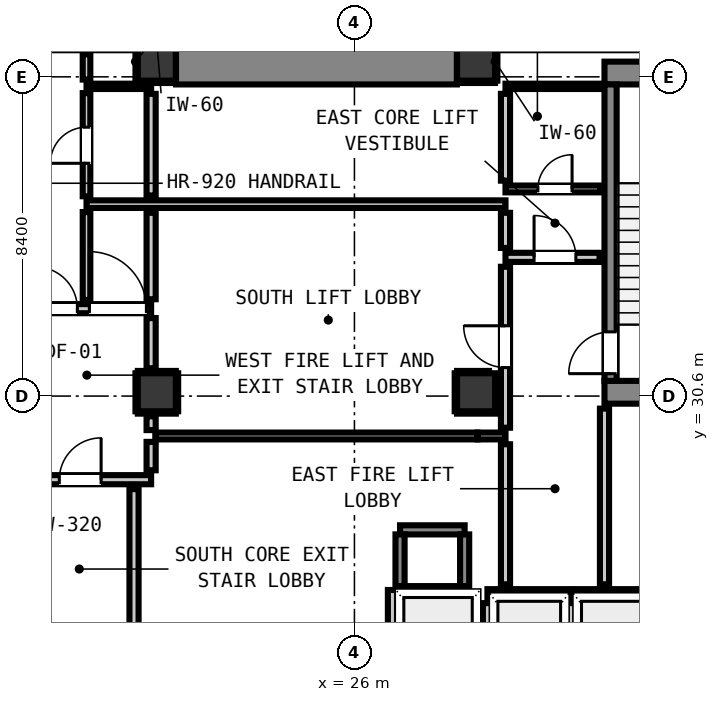
"""IFC4 building model, lengths in metres.
Left out: names, types, materials, properties, quantities, classifications, styles, units other than length and angle.
Written with IfcOpenShell. Run it as: python <this file> out.ifc"""

import sys

from ifc_helpers import new_model, si_unit, direction, frame, frame_2d, origin, origin_2d, place, context, subcontext, project, spatial, rectangle, extrude, element, fill, save


model = new_model("IFC4")
c1 = context("Model", 3, precision=1e-05, world=origin(), true_north=direction((0.0, 1.0)))
c2 = subcontext(c1, "Body", "Model", "MODEL_VIEW")
j1 = project(units=[si_unit("LENGTHUNIT", "METRE"), si_unit("PLANEANGLEUNIT", "RADIAN")], contexts=[c1])
p1 = place(None, origin())
s1 = spatial("IfcSite", under=j1, at=p1, CompositionType="ELEMENT")
p2 = place(p1, origin())
s2 = spatial("IfcBuilding", under=s1, at=p2, CompositionType="ELEMENT")
p3 = place(p2, frame((0.0, 0.0, -13.2)))
s3 = spatial("IfcBuildingStorey", under=s2, at=p3, CompositionType="ELEMENT", Elevation=-13.2)
for number, where, z_axis, x_axis in (
    (1, (20.8, 39.4, -0.4), (0.0, 0.0, 1.0), (1.0, 0.0, 0.0)),
    (2, (29.2, 39.4, -0.4), (0.0, 0.0, 1.0), (1.0, 0.0, 0.0)),
):
    element("IfcColumn", number, at=place(p3, frame(where, z_axis=z_axis, x_axis=x_axis)), inside=s3, PredefinedType="COLUMN", context=c2, shape_type="SweptSolid", body=[
        extrude(rectangle(XDim=1.0, YDim=1.0, at=origin_2d()), origin(), (0.0, 0.0, 1.0), 4.8),
    ])
p4 = place(p3, frame((32.58, 39.1, 0.0), z_axis=(0.0, 0.0, 1.0), x_axis=(1.0, 0.0, 0.0)))
e3 = element("IfcWall", 3, at=p4, inside=s3, PredefinedType="SHEAR", context=c2, shape_type="SweptSolid", body=[
    extrude(rectangle(XDim=4.08, YDim=0.6, at=frame_2d((2.04, 0.0))), origin(), (0.0, 0.0, 1.0), 4.4),
])
p5 = place(p3, frame((32.58, 30.7, 0.0), z_axis=(0.0, 0.0, 1.0), x_axis=(1.0, 0.0, 0.0)))
e4 = element("IfcWall", 4, at=p5, inside=s3, PredefinedType="SHEAR", context=c2, shape_type="SweptSolid", body=[
    extrude(rectangle(XDim=3.415, YDim=0.6, at=frame_2d((1.708, 0.0))), origin(), (0.0, 0.0, 1.0), 4.4),
])
p6 = place(p3, frame((21.305, 39.4, 0.0), z_axis=(0.0, 0.0, 1.0), x_axis=(1.0, 0.0, 0.0)))
e5 = element("IfcWall", 5, at=p6, inside=s3, PredefinedType="SHEAR", context=c2, shape_type="SweptSolid", body=[
    extrude(rectangle(XDim=7.39, YDim=1.2, at=frame_2d((3.695, 0.0))), origin(), (0.0, 0.0, 1.0), 4.4),
])
p7 = place(p3, frame((32.74, 31.0, 0.0), z_axis=(0.0, 0.0, 1.0), x_axis=(0.0, 1.0, 0.0)))
e6 = element("IfcWall", 6, at=p7, inside=s3, PredefinedType="SHEAR", context=c2, shape_type="SweptSolid", body=[
    extrude(rectangle(XDim=7.8, YDim=0.32, at=frame_2d((3.9, 0.0))), origin(), (0.0, 0.0, 1.0), 4.4),
])
p8 = place(p7, frame((0.19, 0.0, 0.0)))
e7 = element("IfcOpeningElement", 7, at=p8, cuts=e6, PredefinedType="OPENING", context=c2, shape_type="SweptSolid", body=[
    extrude(rectangle(XDim=1.1, YDim=2.15, at=frame_2d((0.55, 1.075))), frame((0.0, 0.17, 0.0), z_axis=(0.0, -1.0, 0.0), x_axis=(1.0, 0.0, 0.0)), (0.0, 0.0, 1.0), 0.34),
])
for number, where, z_axis, x_axis in (
    (8, (27.2, 25.48, 0.0), (0.0, 0.0, 1.0), (1.0, 0.0, 0.0)),
    (9, (27.2, 27.08, 0.0), (0.0, 0.0, 1.0), (1.0, 0.0, 0.0)),
):
    element("IfcWall", number, at=place(p3, frame(where, z_axis=z_axis, x_axis=x_axis)), inside=s3, PredefinedType="SHEAR", context=c2, shape_type="SweptSolid", body=[
        extrude(rectangle(XDim=1.7, YDim=0.24, at=frame_2d((0.85, 0.0))), origin(), (0.0, 0.0, 1.0), 4.4),
    ])
for number, where, z_axis, x_axis in (
    (10, (27.2, 25.6, 0.0), (0.0, 0.0, 1.0), (0.0, 1.0, 0.0)),
    (11, (28.9, 25.6, 0.0), (0.0, 0.0, 1.0), (0.0, 1.0, 0.0)),
):
    element("IfcWall", number, at=place(p3, frame(where, z_axis=z_axis, x_axis=x_axis)), inside=s3, PredefinedType="SHEAR", context=c2, shape_type="SweptSolid", body=[
        extrude(rectangle(XDim=1.36, YDim=0.24, at=frame_2d((0.68, 0.0))), origin(), (0.0, 0.0, 1.0), 4.4),
    ])
for number, where, z_axis, x_axis in (
    (12, (20.8, 30.7, -0.4), (0.0, 0.0, 1.0), (1.0, 0.0, 0.0)),
    (13, (29.2, 30.7, -0.4), (0.0, 0.0, 1.0), (1.0, 0.0, 0.0)),
):
    element("IfcColumn", number, at=place(p3, frame(where, z_axis=z_axis, x_axis=x_axis)), inside=s3, PredefinedType="COLUMN", context=c2, shape_type="SweptSolid", body=[
        extrude(rectangle(XDim=1.0, YDim=1.0, at=origin_2d()), origin(), (0.0, 0.0, 1.0), 4.8),
    ])
p9 = place(p3, frame((29.5, 25.4, 0.0), z_axis=(0.0, 0.0, 1.0), x_axis=(1.0, 0.0, 0.0)))
e14 = element("IfcWall", 14, at=p9, inside=s3, PredefinedType="PARTITIONING", context=c2, shape_type="SweptSolid", body=[
    extrude(rectangle(XDim=2.2, YDim=0.24, at=frame_2d((1.1, 0.0))), origin(), (0.0, 0.0, 1.0), 4.1),
])
p10 = place(p3, frame((29.5, 22.632, 0.0), z_axis=(0.0, 0.0, 1.0), x_axis=(0.0, 1.0, 0.0)))
e15 = element("IfcWall", 15, at=p10, inside=s3, PredefinedType="PARTITIONING", context=c2, shape_type="SweptSolid", body=[
    extrude(rectangle(XDim=2.52, YDim=0.24, at=frame_2d((1.26, 0.0))), origin(), (0.0, 0.0, 1.0), 3.135),
])
p11 = place(p3, frame((31.7, 22.73, 0.0), z_axis=(0.0, 0.0, 1.0), x_axis=(0.0, 1.0, 0.0)))
e16 = element("IfcWall", 16, at=p11, inside=s3, PredefinedType="PARTITIONING", context=c2, shape_type="SweptSolid", body=[
    extrude(rectangle(XDim=2.422, YDim=0.24, at=frame_2d((1.211, 0.0))), origin(), (0.0, 0.0, 1.0), 4.1),
])
p12 = place(p3, frame((31.828, 25.4, 0.0), z_axis=(0.0, 0.0, 1.0), x_axis=(1.0, 0.0, 0.0)))
e17 = element("IfcWall", 17, at=p12, inside=s3, PredefinedType="PARTITIONING", context=c2, shape_type="SweptSolid", body=[
    extrude(rectangle(XDim=2.072, YDim=0.24, at=frame_2d((1.036, 0.0))), origin(), (0.0, 0.0, 1.0), 4.1),
])
p13 = place(p3, frame((27.0, 22.73, 0.0), z_axis=(0.0, 0.0, 1.0), x_axis=(0.0, 1.0, 0.0)))
e18 = element("IfcWall", 18, at=p13, inside=s3, PredefinedType="PARTITIONING", context=c2, shape_type="SweptSolid", body=[
    extrude(rectangle(XDim=2.768, YDim=0.24, at=frame_2d((1.384, 0.0))), origin(), (0.0, 0.0, 1.0), 4.1),
])
p14 = place(p3, frame((17.45, 28.4, 0.0), z_axis=(0.0, 0.0, 1.0), x_axis=(1.0, 0.0, 0.0)))
e19 = element("IfcWall", 19, at=p14, inside=s3, PredefinedType="PARTITIONING", context=c2, shape_type="SweptSolid", body=[
    extrude(rectangle(XDim=3.2, YDim=0.24, at=frame_2d((1.6, 0.0))), origin(), (0.0, 0.0, 1.0), 4.1),
])
p15 = place(p14, frame((0.784, 0.0, 0.0)))
e20 = element("IfcOpeningElement", 20, at=p15, cuts=e19, PredefinedType="OPENING", context=c2, shape_type="SweptSolid", body=[
    extrude(rectangle(XDim=1.1, YDim=2.15, at=frame_2d((0.55, 1.075))), frame((0.0, 0.13, 0.0), z_axis=(0.0, -1.0, 0.0), x_axis=(1.0, 0.0, 0.0)), (0.0, 0.0, 1.0), 0.26),
])
p16 = place(p3, frame((17.45, 32.9, 0.0), z_axis=(0.0, 0.0, 1.0), x_axis=(1.0, 0.0, 0.0)))
e21 = element("IfcWall", 21, at=p16, inside=s3, PredefinedType="PARTITIONING", context=c2, shape_type="SweptSolid", body=[
    extrude(rectangle(XDim=3.2, YDim=0.24, at=frame_2d((1.6, 0.0))), origin(), (0.0, 0.0, 1.0), 4.1),
])
p17 = place(p16, frame((0.159, 0.0, 0.0)))
e22 = element("IfcOpeningElement", 22, at=p17, cuts=e21, PredefinedType="OPENING", context=c2, shape_type="SweptSolid", body=[
    extrude(rectangle(XDim=1.1, YDim=2.15, at=frame_2d((0.55, 1.075))), frame((0.0, 0.13, 0.0), z_axis=(0.0, -1.0, 0.0), x_axis=(1.0, 0.0, 0.0)), (0.0, 0.0, 1.0), 0.26),
])
p18 = place(p16, frame((1.576, 0.0, 0.0)))
e23 = element("IfcOpeningElement", 23, at=p18, cuts=e21, PredefinedType="OPENING", context=c2, shape_type="SweptSolid", body=[
    extrude(rectangle(XDim=1.5, YDim=2.15, at=frame_2d((0.75, 1.075))), frame((0.0, 0.13, 0.0), z_axis=(0.0, -1.0, 0.0), x_axis=(1.0, 0.0, 0.0)), (0.0, 0.0, 1.0), 0.26),
])
p19 = place(p3, frame((29.975, 34.25, 0.0), z_axis=(0.0, 0.0, 1.0), x_axis=(1.0, 0.0, 0.0)))
e24 = element("IfcWall", 24, at=p19, inside=s3, PredefinedType="PARTITIONING", context=c2, shape_type="SweptSolid", body=[
    extrude(rectangle(XDim=2.475, YDim=0.24, at=frame_2d((1.237, 0.0))), origin(), (0.0, 0.0, 1.0), 4.1),
])
p20 = place(p19, frame((0.752, 0.0, 0.0)))
e25 = element("IfcOpeningElement", 25, at=p20, cuts=e24, PredefinedType="OPENING", context=c2, shape_type="SweptSolid", body=[
    extrude(rectangle(XDim=1.1, YDim=2.15, at=frame_2d((0.55, 1.075))), frame((0.0, 0.13, 0.0), z_axis=(0.0, -1.0, 0.0), x_axis=(1.0, 0.0, 0.0)), (0.0, 0.0, 1.0), 0.26),
])
p21 = place(p3, frame((18.95, 35.65, 0.0), z_axis=(0.0, 0.0, 1.0), x_axis=(1.0, 0.0, 0.0)))
e26 = element("IfcWall", 26, at=p21, inside=s3, PredefinedType="PARTITIONING", context=c2, shape_type="SweptSolid", body=[
    extrude(rectangle(XDim=11.025, YDim=0.2, at=frame_2d((5.513, 0.0))), origin(), (0.0, 0.0, 1.0), 4.1),
])
p22 = place(p3, frame((20.76, 29.55, 0.0), z_axis=(0.0, 0.0, 1.0), x_axis=(1.0, 0.0, 0.0)))
e27 = element("IfcWall", 27, at=p22, inside=s3, PredefinedType="PARTITIONING", context=c2, shape_type="SweptSolid", body=[
    extrude(rectangle(XDim=8.48, YDim=0.18, at=frame_2d((4.24, 0.0))), origin(), (0.0, 0.0, 1.0), 3.135),
])
p23 = place(p3, frame((29.24, 29.55, 0.0), z_axis=(0.0, 0.0, 1.0), x_axis=(1.0, 0.0, 0.0)))
e28 = element("IfcWall", 28, at=p23, inside=s3, PredefinedType="PARTITIONING", context=c2, shape_type="SweptSolid", body=[
    extrude(rectangle(XDim=0.735, YDim=0.18, at=frame_2d((0.368, 0.0))), origin(), (0.0, 0.0, 1.0), 4.1),
])
p24 = place(p3, frame((29.975, 36.05, 0.0), z_axis=(0.0, 0.0, 1.0), x_axis=(1.0, 0.0, 0.0)))
e29 = element("IfcWall", 29, at=p24, inside=s3, PredefinedType="PARTITIONING", context=c2, shape_type="SweptSolid", body=[
    extrude(rectangle(XDim=2.505, YDim=0.18, at=frame_2d((1.252, 0.0))), origin(), (0.0, 0.0, 1.0), 4.1),
])
p25 = place(p24, frame((0.852, 0.0, 0.0)))
e30 = element("IfcOpeningElement", 30, at=p25, cuts=e29, PredefinedType="OPENING", context=c2, shape_type="SweptSolid", body=[
    extrude(rectangle(XDim=0.9, YDim=2.1, at=frame_2d((0.45, 1.05))), frame((0.0, 0.1, 0.0), z_axis=(0.0, -1.0, 0.0), x_axis=(1.0, 0.0, 0.0)), (0.0, 0.0, 1.0), 0.2),
])
p26 = place(p3, frame((18.95, 38.75, 0.0), z_axis=(0.0, 0.0, 1.0), x_axis=(1.0, 0.0, 0.0)))
e31 = element("IfcWall", 31, at=p26, inside=s3, PredefinedType="PARTITIONING", context=c2, shape_type="SweptSolid", body=[
    extrude(rectangle(XDim=1.7, YDim=0.14, at=frame_2d((0.85, 0.0))), origin(), (0.0, 0.0, 1.0), 4.1),
])
p27 = place(p3, frame((29.975, 38.75, 0.0), z_axis=(0.0, 0.0, 1.0), x_axis=(1.0, 0.0, 0.0)))
e32 = element("IfcWall", 32, at=p27, inside=s3, PredefinedType="PARTITIONING", context=c2, shape_type="SweptSolid", body=[
    extrude(rectangle(XDim=2.525, YDim=0.14, at=frame_2d((1.262, 0.0))), origin(), (0.0, 0.0, 1.0), 4.1),
])
p28 = place(p3, frame((20.2, 22.586, 0.0), z_axis=(0.0, 0.0, 1.0), x_axis=(0.0, 1.0, 0.0)))
e33 = element("IfcWall", 33, at=p28, inside=s3, PredefinedType="PARTITIONING", context=c2, shape_type="SweptSolid", body=[
    extrude(rectangle(XDim=5.566, YDim=0.24, at=frame_2d((2.783, 0.0))), origin(), (0.0, 0.0, 1.0), 4.1),
])
p29 = place(p3, frame((20.65, 28.648, 0.0), z_axis=(0.0, 0.0, 1.0), x_axis=(0.0, 1.0, 0.0)))
e34 = element("IfcWall", 34, at=p29, inside=s3, PredefinedType="PARTITIONING", context=c2, shape_type="SweptSolid", body=[
    extrude(rectangle(XDim=0.747, YDim=0.24, at=frame_2d((0.374, 0.0))), origin(), (0.0, 0.0, 1.0), 3.135),
])
p30 = place(p3, frame((20.65, 29.705, 0.0), z_axis=(0.0, 0.0, 1.0), x_axis=(0.0, 1.0, 0.0)))
e35 = element("IfcWall", 35, at=p30, inside=s3, PredefinedType="PARTITIONING", context=c2, shape_type="SweptSolid", body=[
    extrude(rectangle(XDim=0.363, YDim=0.24, at=frame_2d((0.182, 0.0))), origin(), (0.0, 0.0, 1.0), 3.135),
])
p31 = place(p3, frame((20.65, 31.332, 0.0), z_axis=(0.0, 0.0, 1.0), x_axis=(0.0, 1.0, 0.0)))
e36 = element("IfcWall", 36, at=p31, inside=s3, PredefinedType="PARTITIONING", context=c2, shape_type="SweptSolid", body=[
    extrude(rectangle(XDim=1.32, YDim=0.24, at=frame_2d((0.66, 0.0))), origin(), (0.0, 0.0, 1.0), 3.135),
])
p32 = place(p3, frame((20.65, 33.148, 0.0), z_axis=(0.0, 0.0, 1.0), x_axis=(0.0, 1.0, 0.0)))
e37 = element("IfcWall", 37, at=p32, inside=s3, PredefinedType="PARTITIONING", context=c2, shape_type="SweptSolid", body=[
    extrude(rectangle(XDim=2.274, YDim=0.24, at=frame_2d((1.137, 0.0))), origin(), (0.0, 0.0, 1.0), 3.135),
])
p33 = place(p3, frame((20.65, 35.878, 0.0), z_axis=(0.0, 0.0, 1.0), x_axis=(0.0, 1.0, 0.0)))
e38 = element("IfcWall", 38, at=p33, inside=s3, PredefinedType="PARTITIONING", context=c2, shape_type="SweptSolid", body=[
    extrude(rectangle(XDim=2.674, YDim=0.24, at=frame_2d((1.337, 0.0))), origin(), (0.0, 0.0, 1.0), 3.135),
])
p34 = place(p3, frame((29.975, 25.648, 0.0), z_axis=(0.0, 0.0, 1.0), x_axis=(0.0, 1.0, 0.0)))
e39 = element("IfcWall", 39, at=p34, inside=s3, PredefinedType="PARTITIONING", context=c2, shape_type="SweptSolid", body=[
    extrude(rectangle(XDim=3.684, YDim=0.24, at=frame_2d((1.842, 0.0))), origin(), (0.0, 0.0, 1.0), 4.1),
])
p35 = place(p3, frame((29.975, 29.768, 0.0), z_axis=(0.0, 0.0, 1.0), x_axis=(0.0, 1.0, 0.0)))
e40 = element("IfcWall", 40, at=p35, inside=s3, PredefinedType="PARTITIONING", context=c2, shape_type="SweptSolid", body=[
    extrude(rectangle(XDim=4.234, YDim=0.24, at=frame_2d((2.117, 0.0))), origin(), (0.0, 0.0, 1.0), 4.1),
])
p36 = place(p35, frame((1.582, 0.0, 0.0)))
e41 = element("IfcOpeningElement", 41, at=p36, cuts=e40, PredefinedType="OPENING", context=c2, shape_type="SweptSolid", body=[
    extrude(rectangle(XDim=1.1, YDim=2.15, at=frame_2d((0.55, 1.075))), frame((0.0, 0.13, 0.0), z_axis=(0.0, -1.0, 0.0), x_axis=(1.0, 0.0, 0.0)), (0.0, 0.0, 1.0), 0.26),
])
p37 = place(p3, frame((29.975, 34.498, 0.0), z_axis=(0.0, 0.0, 1.0), x_axis=(0.0, 1.0, 0.0)))
e42 = element("IfcWall", 42, at=p37, inside=s3, PredefinedType="PARTITIONING", context=c2, shape_type="SweptSolid", body=[
    extrude(rectangle(XDim=0.924, YDim=0.24, at=frame_2d((0.462, 0.0))), origin(), (0.0, 0.0, 1.0), 4.1),
])
p38 = place(p3, frame((29.975, 36.268, 0.0), z_axis=(0.0, 0.0, 1.0), x_axis=(0.0, 1.0, 0.0)))
e43 = element("IfcWall", 43, at=p38, inside=s3, PredefinedType="PARTITIONING", context=c2, shape_type="SweptSolid", body=[
    extrude(rectangle(XDim=2.284, YDim=0.24, at=frame_2d((1.142, 0.0))), origin(), (0.0, 0.0, 1.0), 4.1),
])
p39 = place(p3, frame((32.58, 25.648, 0.0), z_axis=(0.0, 0.0, 1.0), x_axis=(0.0, 1.0, 0.0)))
e44 = element("IfcWall", 44, at=p39, inside=s3, PredefinedType="PARTITIONING", context=c2, shape_type="SweptSolid", body=[
    extrude(rectangle(XDim=4.622, YDim=0.24, at=frame_2d((2.311, 0.0))), origin(), (0.0, 0.0, 1.0), 4.1),
])
p40 = place(p3, frame((18.95, 33.128, 0.0), z_axis=(0.0, 0.0, 1.0), x_axis=(0.0, 1.0, 0.0)))
e45 = element("IfcWall", 45, at=p40, inside=s3, PredefinedType="PARTITIONING", context=c2, shape_type="SweptSolid", body=[
    extrude(rectangle(XDim=2.314, YDim=0.2, at=frame_2d((1.157, 0.0))), origin(), (0.0, 0.0, 1.0), 4.1),
])
p41 = place(p3, frame((18.95, 35.858, 0.0), z_axis=(0.0, 0.0, 1.0), x_axis=(0.0, 1.0, 0.0)))
e46 = element("IfcWall", 46, at=p41, inside=s3, PredefinedType="PARTITIONING", context=c2, shape_type="SweptSolid", body=[
    extrude(rectangle(XDim=2.714, YDim=0.2, at=frame_2d((1.357, 0.0))), origin(), (0.0, 0.0, 1.0), 4.1),
])
p42 = place(p41, frame((0.867, 0.0, 0.0)))
e47 = element("IfcOpeningElement", 47, at=p42, cuts=e46, PredefinedType="OPENING", context=c2, shape_type="SweptSolid", body=[
    extrude(rectangle(XDim=0.95, YDim=2.1, at=frame_2d((0.475, 1.05))), frame((0.0, 0.11, 0.0), z_axis=(0.0, -1.0, 0.0), x_axis=(1.0, 0.0, 0.0)), (0.0, 0.0, 1.0), 0.22),
])
p43 = place(p3, frame((18.95, 38.928, 0.0), z_axis=(0.0, 0.0, 1.0), x_axis=(0.0, 1.0, 0.0)))
e48 = element("IfcWall", 48, at=p43, inside=s3, PredefinedType="PARTITIONING", context=c2, shape_type="SweptSolid", body=[
    extrude(rectangle(XDim=0.664, YDim=0.2, at=frame_2d((0.332, 0.0))), origin(), (0.0, 0.0, 1.0), 4.1),
])
p44 = place(p3, frame((20.3, 38.868, 0.0), z_axis=(0.0, 0.0, 1.0), x_axis=(1.0, 0.0, 0.0)))
e49 = element("IfcWall", 49, at=p44, inside=s3, PredefinedType="PARTITIONING", context=c2, shape_type="SweptSolid", body=[
    extrude(rectangle(XDim=0.99, YDim=0.06, at=frame_2d((0.495, 0.0))), origin(), (0.0, 0.0, 1.0), 1.45),
])
p45 = place(p3, frame((20.268, 38.9, 0.0), z_axis=(0.0, 0.0, 1.0), x_axis=(0.0, 1.0, 0.0)))
e50 = element("IfcWall", 50, at=p45, inside=s3, PredefinedType="PARTITIONING", context=c2, shape_type="SweptSolid", body=[
    extrude(rectangle(XDim=1.0, YDim=0.06, at=frame_2d((0.5, 0.0))), origin(), (0.0, 0.0, 1.0), 1.45),
])
p46 = place(p3, frame((28.71, 38.868, 0.0), z_axis=(0.0, 0.0, 1.0), x_axis=(1.0, 0.0, 0.0)))
e51 = element("IfcWall", 51, at=p46, inside=s3, PredefinedType="PARTITIONING", context=c2, shape_type="SweptSolid", body=[
    extrude(rectangle(XDim=0.99, YDim=0.06, at=frame_2d((0.495, 0.0))), origin(), (0.0, 0.0, 1.0), 1.45),
])
for number, where, z_axis, x_axis in (
    (52, (29.732, 38.9, 0.0), (0.0, 0.0, 1.0), (0.0, 1.0, 0.0)),
    (53, (20.3, 30.168, 0.0), (0.0, 0.0, 1.0), (1.0, 0.0, 0.0)),
    (54, (20.3, 31.232, 0.0), (0.0, 0.0, 1.0), (1.0, 0.0, 0.0)),
    (55, (20.268, 30.2, 0.0), (0.0, 0.0, 1.0), (0.0, 1.0, 0.0)),
    (56, (21.332, 30.2, 0.0), (0.0, 0.0, 1.0), (0.0, 1.0, 0.0)),
    (57, (28.7, 30.168, 0.0), (0.0, 0.0, 1.0), (1.0, 0.0, 0.0)),
):
    element("IfcWall", number, at=place(p3, frame(where, z_axis=z_axis, x_axis=x_axis)), inside=s3, PredefinedType="PARTITIONING", context=c2, shape_type="SweptSolid", body=[
        extrude(rectangle(XDim=1.0, YDim=0.06, at=frame_2d((0.5, 0.0))), origin(), (0.0, 0.0, 1.0), 1.45),
    ])
p47 = place(p3, frame((28.7, 31.232, 0.0), z_axis=(0.0, 0.0, 1.0), x_axis=(1.0, 0.0, 0.0)))
e58 = element("IfcWall", 58, at=p47, inside=s3, PredefinedType="PARTITIONING", context=c2, shape_type="SweptSolid", body=[
    extrude(rectangle(XDim=0.841, YDim=0.06, at=frame_2d((0.42, 0.0))), origin(), (0.0, 0.0, 1.0), 1.45),
])
p48 = place(p3, frame((28.668, 30.2, 0.0), z_axis=(0.0, 0.0, 1.0), x_axis=(0.0, 1.0, 0.0)))
e59 = element("IfcWall", 59, at=p48, inside=s3, PredefinedType="PARTITIONING", context=c2, shape_type="SweptSolid", body=[
    extrude(rectangle(XDim=1.0, YDim=0.06, at=frame_2d((0.5, 0.0))), origin(), (0.0, 0.0, 1.0), 1.45),
])
p49 = place(p3, frame((29.732, 30.2, 0.0), z_axis=(0.0, 0.0, 1.0), x_axis=(0.0, 1.0, 0.0)))
e60 = element("IfcWall", 60, at=p49, inside=s3, PredefinedType="PARTITIONING", context=c2, shape_type="SweptSolid", body=[
    extrude(rectangle(XDim=0.772, YDim=0.06, at=frame_2d((0.386, 0.0))), origin(), (0.0, 0.0, 1.0), 1.45),
])
p50 = place(p8, origin())
e61 = element("IfcDoor", 61, at=p50, inside=s3, OperationType="SINGLE_SWING_LEFT", PredefinedType="DOOR", context=c2, shape_type="SweptSolid", body=[
    extrude(rectangle(XDim=1.1, YDim=2.15, at=frame_2d((0.55, 1.075))), frame((0.0, 0.025, 0.0), z_axis=(0.0, -1.0, 0.0), x_axis=(1.0, 0.0, 0.0)), (0.0, 0.0, 1.0), 0.05),
])
fill(e7, e61)
p51 = place(p15, origin())
e62 = element("IfcDoor", 62, at=p51, inside=s3, OperationType="SINGLE_SWING_RIGHT", PredefinedType="DOOR", context=c2, shape_type="SweptSolid", body=[
    extrude(rectangle(XDim=1.1, YDim=2.15, at=frame_2d((0.55, 1.075))), frame((0.0, 0.025, 0.0), z_axis=(0.0, -1.0, 0.0), x_axis=(1.0, 0.0, 0.0)), (0.0, 0.0, 1.0), 0.05),
])
fill(e20, e62)
p52 = place(p17, origin())
e63 = element("IfcDoor", 63, at=p52, inside=s3, OperationType="SINGLE_SWING_LEFT", PredefinedType="DOOR", context=c2, shape_type="SweptSolid", body=[
    extrude(rectangle(XDim=1.1, YDim=2.15, at=frame_2d((0.55, 1.075))), frame((0.0, 0.025, 0.0), z_axis=(0.0, -1.0, 0.0), x_axis=(1.0, 0.0, 0.0)), (0.0, 0.0, 1.0), 0.05),
])
fill(e22, e63)
p53 = place(p36, origin())
e64 = element("IfcDoor", 64, at=p53, inside=s3, OperationType="SINGLE_SWING_RIGHT", PredefinedType="DOOR", context=c2, shape_type="SweptSolid", body=[
    extrude(rectangle(XDim=1.1, YDim=2.15, at=frame_2d((0.55, 1.075))), frame((0.0, 0.025, 0.0), z_axis=(0.0, -1.0, 0.0), x_axis=(1.0, 0.0, 0.0)), (0.0, 0.0, 1.0), 0.05),
])
fill(e41, e64)
p54 = place(p20, origin())
e65 = element("IfcDoor", 65, at=p54, inside=s3, OperationType="SINGLE_SWING_LEFT", PredefinedType="DOOR", context=c2, shape_type="SweptSolid", body=[
    extrude(rectangle(XDim=1.1, YDim=2.15, at=frame_2d((0.55, 1.075))), frame((0.0, 0.025, 0.0), z_axis=(0.0, -1.0, 0.0), x_axis=(1.0, 0.0, 0.0)), (0.0, 0.0, 1.0), 0.05),
])
fill(e25, e65)
p55 = place(p18, origin())
e66 = element("IfcDoor", 66, at=p55, inside=s3, OperationType="SINGLE_SWING_LEFT", PredefinedType="DOOR", context=c2, shape_type="SweptSolid", body=[
    extrude(rectangle(XDim=1.5, YDim=2.15, at=frame_2d((0.75, 1.075))), frame((0.0, 0.025, 0.0), z_axis=(0.0, -1.0, 0.0), x_axis=(1.0, 0.0, 0.0)), (0.0, 0.0, 1.0), 0.05),
])
fill(e23, e66)
p56 = place(p25, origin())
e67 = element("IfcDoor", 67, at=p56, inside=s3, OperationType="SINGLE_SWING_RIGHT", PredefinedType="DOOR", context=c2, shape_type="SweptSolid", body=[
    extrude(rectangle(XDim=0.9, YDim=2.1, at=frame_2d((0.45, 1.05))), frame((0.0, 0.025, 0.0), z_axis=(0.0, -1.0, 0.0), x_axis=(1.0, 0.0, 0.0)), (0.0, 0.0, 1.0), 0.05),
])
fill(e30, e67)
p57 = place(p42, origin())
e68 = element("IfcDoor", 68, at=p57, inside=s3, OperationType="SINGLE_SWING_LEFT", PredefinedType="DOOR", context=c2, shape_type="SweptSolid", body=[
    extrude(rectangle(XDim=0.95, YDim=2.1, at=frame_2d((0.475, 1.05))), frame((0.0, 0.025, 0.0), z_axis=(0.0, -1.0, 0.0), x_axis=(1.0, 0.0, 0.0)), (0.0, 0.0, 1.0), 0.05),
])
fill(e47, e68)
save(model, sys.argv[1])
